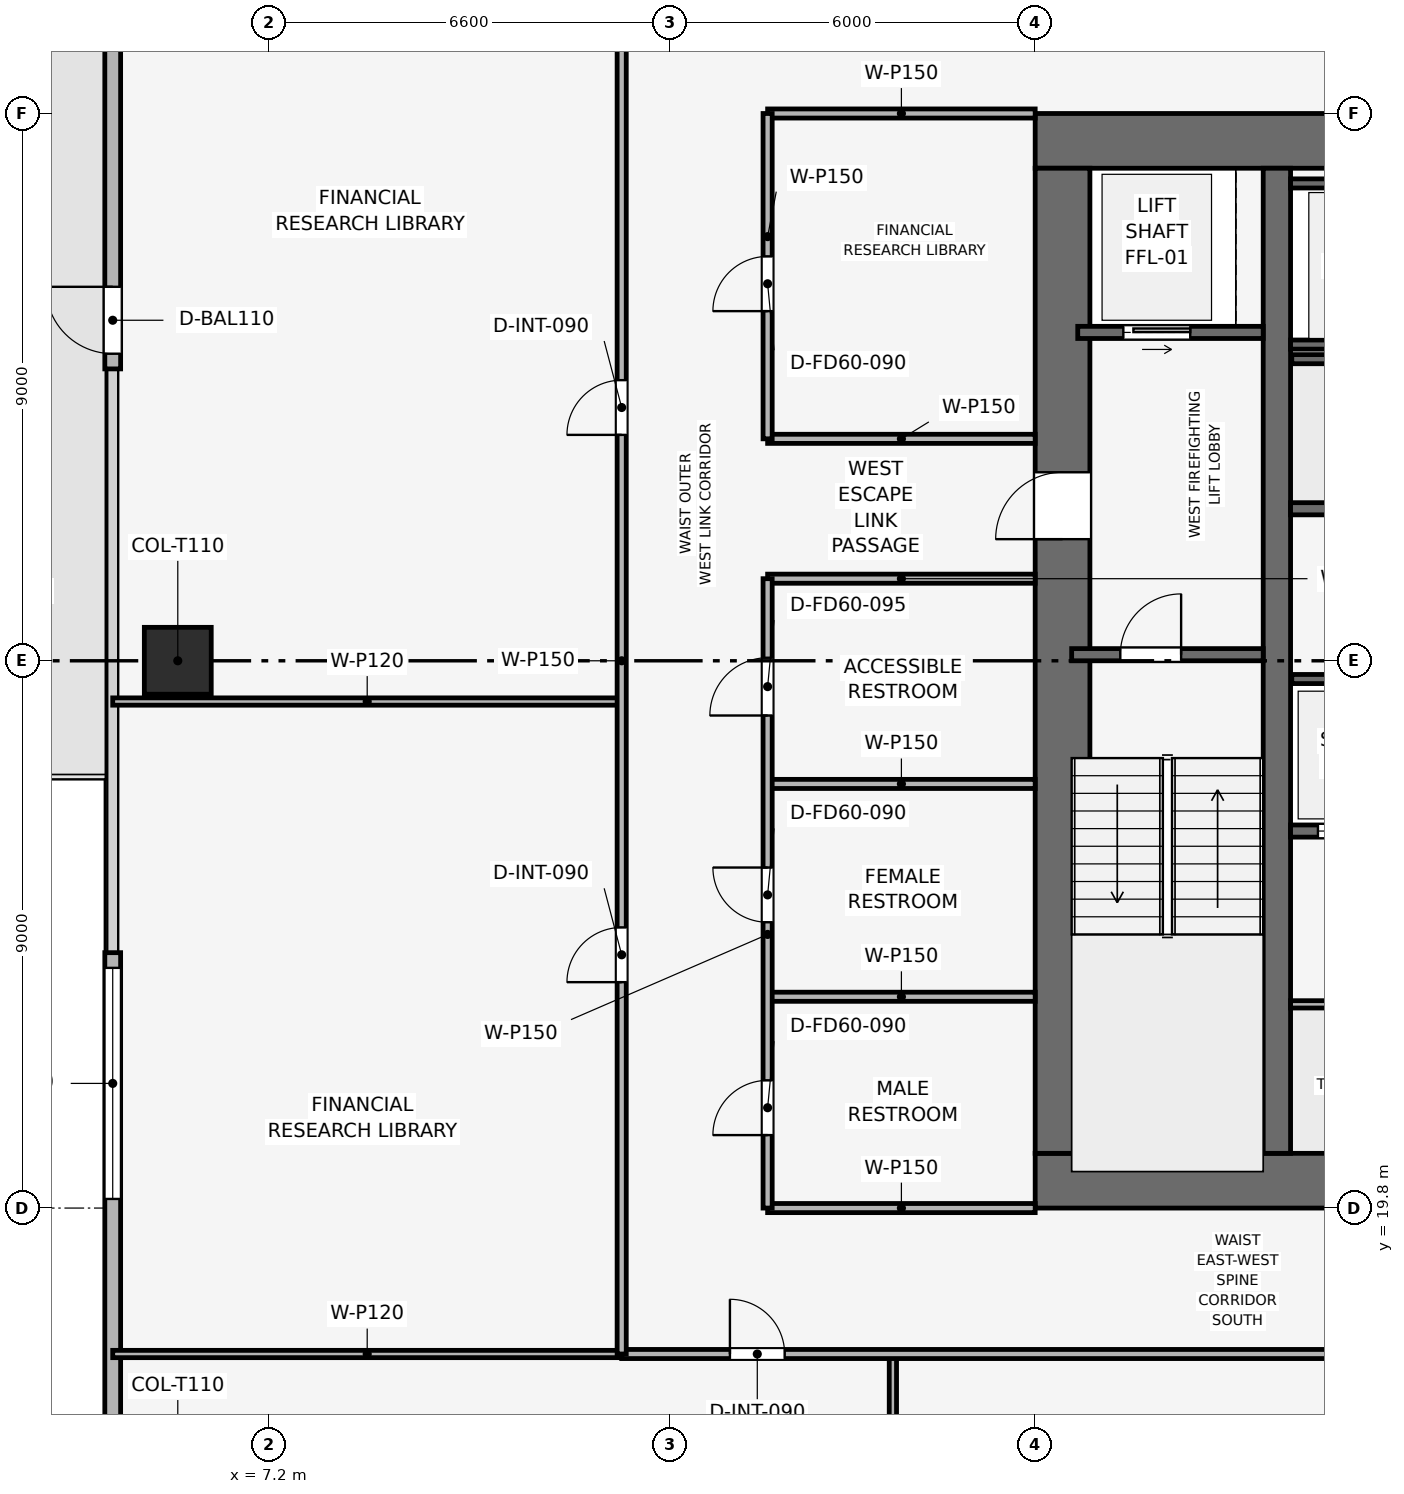
"""IFC4 building model, lengths in metres.
Left out: names, types, materials, properties, quantities, classifications, styles, units other than length and angle.
Written with IfcOpenShell. Run it as: python <this file> out.ifc"""

import sys

from ifc_helpers import new_model, si_unit, direction, frame, frame_2d, origin, origin_2d, place, context, subcontext, project, spatial, rectangle, extrude, element, fill, save


model = new_model("IFC4")
c1 = context("Model", 3, precision=1e-05, world=origin(), true_north=direction((0.0, 1.0)))
c2 = subcontext(c1, "Body", "Model", "MODEL_VIEW")
j1 = project(units=[si_unit("LENGTHUNIT", "METRE"), si_unit("PLANEANGLEUNIT", "RADIAN")], contexts=[c1])
p1 = place(None, origin())
s1 = spatial("IfcSite", under=j1, at=p1, CompositionType="ELEMENT")
p2 = place(p1, origin())
s2 = spatial("IfcBuilding", under=s1, at=p2, CompositionType="ELEMENT")
p3 = place(p2, frame((0.0, 0.0, 183.3)))
s3 = spatial("IfcBuildingStorey", under=s2, at=p3, CompositionType="ELEMENT", Elevation=183.3)
p4 = place(p3, frame((19.8, 20.25, 0.0), z_axis=(0.0, 0.0, 1.0), x_axis=(1.0, 0.0, 0.0)))
e1 = element("IfcWall", 1, at=p4, inside=s3, PredefinedType="SHEAR", context=c2, shape_type="SweptSolid", body=[
    extrude(rectangle(XDim=18.0, YDim=0.9, at=frame_2d((9.0, 0.0))), origin(), (0.0, 0.0, 1.0), 3.75),
])
p5 = place(p4, frame((8.4, 0.0, 0.0)))
e2 = element("IfcOpeningElement", 2, at=p5, cuts=e1, PredefinedType="OPENING", context=c2, shape_type="SweptSolid", body=[
    extrude(rectangle(XDim=1.2, YDim=2.2, at=frame_2d((0.6, 1.1))), frame((0.0, 0.46, 0.0), z_axis=(0.0, -1.0, 0.0), x_axis=(1.0, 0.0, 0.0)), (0.0, 0.0, 1.0), 0.92),
])
p6 = place(p3, frame((19.8, 37.35, 0.0), z_axis=(0.0, 0.0, 1.0), x_axis=(1.0, 0.0, 0.0)))
e3 = element("IfcWall", 3, at=p6, inside=s3, PredefinedType="SHEAR", context=c2, shape_type="SweptSolid", body=[
    extrude(rectangle(XDim=18.0, YDim=0.9, at=frame_2d((9.0, 0.0))), origin(), (0.0, 0.0, 1.0), 3.75),
])
p7 = place(p6, frame((7.05, 0.0, 0.0)))
e4 = element("IfcOpeningElement", 4, at=p7, cuts=e3, PredefinedType="OPENING", context=c2, shape_type="SweptSolid", body=[
    extrude(rectangle(XDim=1.1, YDim=2.15, at=frame_2d((0.55, 1.075))), frame((0.0, 0.46, 0.0), z_axis=(0.0, -1.0, 0.0), x_axis=(1.0, 0.0, 0.0)), (0.0, 0.0, 1.0), 0.92),
])
p8 = place(p3, frame((20.25, 20.7, 0.0), z_axis=(0.0, 0.0, 1.0), x_axis=(0.0, 1.0, 0.0)))
e5 = element("IfcWall", 5, at=p8, inside=s3, PredefinedType="SHEAR", context=c2, shape_type="SweptSolid", body=[
    extrude(rectangle(XDim=16.2, YDim=0.9, at=frame_2d((8.1, 0.0))), origin(), (0.0, 0.0, 1.0), 3.75),
])
p9 = place(p8, frame((10.1, 0.0, 0.0)))
e6 = element("IfcOpeningElement", 6, at=p9, cuts=e5, PredefinedType="OPENING", context=c2, shape_type="SweptSolid", body=[
    extrude(rectangle(XDim=1.1, YDim=2.15, at=frame_2d((0.55, 1.075))), frame((0.0, 0.46, 0.0), z_axis=(0.0, -1.0, 0.0), x_axis=(1.0, 0.0, 0.0)), (0.0, 0.0, 1.0), 0.92),
])
p10 = place(p3, frame((23.775, 20.7, 0.0), z_axis=(0.0, 0.0, 1.0), x_axis=(0.0, 1.0, 0.0)))
e7 = element("IfcWall", 7, at=p10, inside=s3, PredefinedType="SHEAR", context=c2, shape_type="SweptSolid", body=[
    extrude(rectangle(XDim=16.2, YDim=0.45, at=frame_2d((8.1, 0.0))), origin(), (0.0, 0.0, 1.0), 3.75),
])
p11 = place(p3, frame((5.7, 28.8, 0.003), z_axis=(0.0, 0.0, 1.0), x_axis=(1.0, 0.0, 0.0)))
e8 = element("IfcColumn", 8, at=p11, inside=s3, PredefinedType="COLUMN", context=c2, shape_type="SweptSolid", body=[
    extrude(rectangle(XDim=1.1, YDim=1.1, at=origin_2d()), origin(), (0.0, 0.0, 1.0), 3.489),
])
p12 = place(p3, frame((4.63, 11.4, 0.0), z_axis=(0.0, 0.0, 1.0), x_axis=(0.0, 1.0, 0.0)))
e9 = element("IfcWall", 9, at=p12, inside=s3, PredefinedType="SOLIDWALL", context=c2, shape_type="SweptSolid", body=[
    extrude(rectangle(XDim=12.6, YDim=0.26, at=frame_2d((6.3, 0.0))), origin(), (0.0, 0.0, 1.0), 3.495),
])
p13 = place(p12, frame((8.55, 0.0, 0.9)))
e10 = element("IfcOpeningElement", 10, at=p13, cuts=e9, PredefinedType="OPENING", context=c2, shape_type="SweptSolid", body=[
    extrude(rectangle(XDim=3.8, YDim=1.9, at=frame_2d((1.9, 0.95))), frame((0.0, 0.14, 0.0), z_axis=(0.0, -1.0, 0.0), x_axis=(1.0, 0.0, 0.0)), (0.0, 0.0, 1.0), 0.28),
])
p14 = place(p3, frame((4.63, 33.6, 0.0), z_axis=(0.0, 0.0, 1.0), x_axis=(0.0, 1.0, 0.0)))
e11 = element("IfcWall", 11, at=p14, inside=s3, PredefinedType="SOLIDWALL", context=c2, shape_type="SweptSolid", body=[
    extrude(rectangle(XDim=12.6, YDim=0.26, at=frame_2d((6.3, 0.0))), origin(), (0.0, 0.0, 1.0), 3.495),
])
p15 = place(p14, frame((0.25, 0.0, 0.0)))
e12 = element("IfcOpeningElement", 12, at=p15, cuts=e11, PredefinedType="OPENING", context=c2, shape_type="SweptSolid", body=[
    extrude(rectangle(XDim=1.1, YDim=2.2, at=frame_2d((0.55, 1.1))), frame((0.0, 0.14, 0.0), z_axis=(0.0, -1.0, 0.0), x_axis=(1.0, 0.0, 0.0)), (0.0, 0.0, 1.0), 0.28),
])
p16 = place(p3, frame((20.4, 28.9, 0.0), z_axis=(0.0, 0.0, 1.0), x_axis=(1.0, 0.0, 0.0)))
e13 = element("IfcWall", 13, at=p16, inside=s3, PredefinedType="SHEAR", context=c2, shape_type="SweptSolid", body=[
    extrude(rectangle(XDim=3.15, YDim=0.2, at=frame_2d((1.575, 0.0))), origin(), (0.0, 0.0, 1.0), 3.495),
])
p17 = place(p16, frame((0.8, 0.0, 0.0)))
e14 = element("IfcOpeningElement", 14, at=p17, cuts=e13, PredefinedType="OPENING", context=c2, shape_type="SweptSolid", body=[
    extrude(rectangle(XDim=1.0, YDim=2.1, at=frame_2d((0.5, 1.05))), frame((0.0, 0.11, 0.0), z_axis=(0.0, -1.0, 0.0), x_axis=(1.0, 0.0, 0.0)), (0.0, 0.0, 1.0), 0.22),
])
p18 = place(p3, frame((20.5, 34.2, 0.0), z_axis=(0.0, 0.0, 1.0), x_axis=(1.0, 0.0, 0.0)))
e15 = element("IfcWall", 15, at=p18, inside=s3, PredefinedType="SHEAR", context=c2, shape_type="SweptSolid", body=[
    extrude(rectangle(XDim=3.05, YDim=0.2, at=frame_2d((1.525, 0.0))), origin(), (0.0, 0.0, 1.0), 3.495),
])
p19 = place(p18, frame((0.75, 0.0, 0.0)))
e16 = element("IfcOpeningElement", 16, at=p19, cuts=e15, PredefinedType="OPENING", context=c2, shape_type="SweptSolid", body=[
    extrude(rectangle(XDim=1.1, YDim=2.15, at=frame_2d((0.55, 1.075))), frame((0.0, 0.11, 0.0), z_axis=(0.0, -1.0, 0.0), x_axis=(1.0, 0.0, 0.0)), (0.0, 0.0, 1.0), 0.22),
])
for number, where, z_axis, x_axis in (
    (17, (24.0, 34.0, 0.0), (0.0, 0.0, 1.0), (1.0, 0.0, 0.0)),
    (18, (24.0, 36.65, 0.0), (0.0, 0.0, 1.0), (1.0, 0.0, 0.0)),
):
    element("IfcWall", number, at=place(p3, frame(where, z_axis=z_axis, x_axis=x_axis)), inside=s3, PredefinedType="SHEAR", context=c2, shape_type="SweptSolid", body=[
        extrude(rectangle(XDim=2.48, YDim=0.15, at=frame_2d((1.24, 0.0))), origin(), (0.0, 0.0, 1.0), 3.495),
    ])
p20 = place(p3, frame((24.0, 26.0, 0.0), z_axis=(0.0, 0.0, 1.0), x_axis=(1.0, 0.0, 0.0)))
e19 = element("IfcWall", 19, at=p20, inside=s3, PredefinedType="SHEAR", context=c2, shape_type="SweptSolid", body=[
    extrude(rectangle(XDim=2.0, YDim=0.2, at=frame_2d((1.0, 0.0))), origin(), (0.0, 0.0, 1.0), 3.495),
])
p21 = place(p20, frame((0.45, 0.0, 0.0)))
e20 = element("IfcOpeningElement", 20, at=p21, cuts=e19, PredefinedType="OPENING", context=c2, shape_type="SweptSolid", body=[
    extrude(rectangle(XDim=1.1, YDim=2.15, at=frame_2d((0.55, 1.075))), frame((0.0, 0.11, 0.0), z_axis=(0.0, -1.0, 0.0), x_axis=(1.0, 0.0, 0.0)), (0.0, 0.0, 1.0), 0.22),
])
p22 = place(p3, frame((24.0, 31.3, 0.0), z_axis=(0.0, 0.0, 1.0), x_axis=(1.0, 0.0, 0.0)))
e21 = element("IfcWall", 21, at=p22, inside=s3, PredefinedType="SHEAR", context=c2, shape_type="SweptSolid", body=[
    extrude(rectangle(XDim=2.0, YDim=0.2, at=frame_2d((1.0, 0.0))), origin(), (0.0, 0.0, 1.0), 3.495),
])
for number, where, z_axis, x_axis in (
    (22, (24.02, 28.5, 0.0), (0.0, 0.0, 1.0), (1.0, 0.0, 0.0)),
    (23, (24.02, 33.76, 0.0), (0.0, 0.0, 1.0), (1.0, 0.0, 0.0)),
):
    element("IfcWall", number, at=place(p3, frame(where, z_axis=z_axis, x_axis=x_axis)), inside=s3, PredefinedType="SHEAR", context=c2, shape_type="SweptSolid", body=[
        extrude(rectangle(XDim=4.08, YDim=0.15, at=frame_2d((2.04, 0.0))), origin(), (0.0, 0.0, 1.0), 3.495),
    ])
p23 = place(p3, frame((24.0, 23.15, 0.0), z_axis=(0.0, 0.0, 1.0), x_axis=(1.0, 0.0, 0.0)))
e24 = element("IfcWall", 24, at=p23, inside=s3, PredefinedType="PARTITIONING", context=c2, shape_type="SweptSolid", body=[
    extrude(rectangle(XDim=4.05, YDim=0.12, at=frame_2d((2.025, 0.0))), origin(), (0.0, 0.0, 1.0), 3.495),
])
p24 = place(p23, frame((1.575, 0.0, 0.0)))
e25 = element("IfcOpeningElement", 25, at=p24, cuts=e24, PredefinedType="OPENING", context=c2, shape_type="SweptSolid", body=[
    extrude(rectangle(XDim=0.9, YDim=2.1, at=frame_2d((0.45, 1.05))), frame((0.0, 0.07, 0.0), z_axis=(0.0, -1.0, 0.0), x_axis=(1.0, 0.0, 0.0)), (0.0, 0.0, 1.0), 0.14),
])
p25 = place(p3, frame((15.4, 19.8, 0.0), z_axis=(0.0, 0.0, 1.0), x_axis=(1.0, 0.0, 0.0)))
e26 = element("IfcWall", 26, at=p25, inside=s3, PredefinedType="PARTITIONING", context=c2, shape_type="SweptSolid", body=[
    extrude(rectangle(XDim=4.4, YDim=0.15, at=frame_2d((2.2, 0.0))), origin(), (0.0, 0.0, 1.0), 3.03),
])
for number, where, z_axis, x_axis in (
    (27, (15.4, 23.275, 0.0), (0.0, 0.0, 1.0), (1.0, 0.0, 0.0)),
    (28, (15.4, 26.775, 0.0), (0.0, 0.0, 1.0), (1.0, 0.0, 0.0)),
    (29, (15.4, 30.15, 0.0), (0.0, 0.0, 1.0), (1.0, 0.0, 0.0)),
    (30, (15.4, 32.45, 0.0), (0.0, 0.0, 1.0), (1.0, 0.0, 0.0)),
):
    element("IfcWall", number, at=place(p3, frame(where, z_axis=z_axis, x_axis=x_axis)), inside=s3, PredefinedType="PARTITIONING", context=c2, shape_type="SweptSolid", body=[
        extrude(rectangle(XDim=4.4, YDim=0.15, at=frame_2d((2.2, 0.0))), origin(), (0.0, 0.0, 1.0), 3.495),
    ])
p26 = place(p3, frame((15.4, 37.8, 0.0), z_axis=(0.0, 0.0, 1.0), x_axis=(1.0, 0.0, 0.0)))
e31 = element("IfcWall", 31, at=p26, inside=s3, PredefinedType="PARTITIONING", context=c2, shape_type="SweptSolid", body=[
    extrude(rectangle(XDim=4.4, YDim=0.15, at=frame_2d((2.2, 0.0))), origin(), (0.0, 0.0, 1.0), 3.03),
])
p27 = place(p3, frame((15.4, 19.8, 0.0), z_axis=(0.0, 0.0, 1.0), x_axis=(0.0, 1.0, 0.0)))
e32 = element("IfcWall", 32, at=p27, inside=s3, PredefinedType="PARTITIONING", context=c2, shape_type="SweptSolid", body=[
    extrude(rectangle(XDim=10.35, YDim=0.15, at=frame_2d((5.175, 0.0))), origin(), (0.0, 0.0, 1.0), 3.03),
])
p28 = place(p27, frame((1.2, 0.0, 0.0)))
e33 = element("IfcOpeningElement", 33, at=p28, cuts=e32, PredefinedType="OPENING", context=c2, shape_type="SweptSolid", body=[
    extrude(rectangle(XDim=0.9, YDim=2.1, at=frame_2d((0.45, 1.05))), frame((0.0, 0.085, 0.0), z_axis=(0.0, -1.0, 0.0), x_axis=(1.0, 0.0, 0.0)), (0.0, 0.0, 1.0), 0.17),
])
p29 = place(p27, frame((4.7, 0.0, 0.0)))
e34 = element("IfcOpeningElement", 34, at=p29, cuts=e32, PredefinedType="OPENING", context=c2, shape_type="SweptSolid", body=[
    extrude(rectangle(XDim=0.9, YDim=2.1, at=frame_2d((0.45, 1.05))), frame((0.0, 0.085, 0.0), z_axis=(0.0, -1.0, 0.0), x_axis=(1.0, 0.0, 0.0)), (0.0, 0.0, 1.0), 0.17),
])
p30 = place(p27, frame((8.1, 0.0, 0.0)))
e35 = element("IfcOpeningElement", 35, at=p30, cuts=e32, PredefinedType="OPENING", context=c2, shape_type="SweptSolid", body=[
    extrude(rectangle(XDim=0.95, YDim=2.1, at=frame_2d((0.475, 1.05))), frame((0.0, 0.085, 0.0), z_axis=(0.0, -1.0, 0.0), x_axis=(1.0, 0.0, 0.0)), (0.0, 0.0, 1.0), 0.17),
])
p31 = place(p3, frame((15.4, 32.45, 0.0), z_axis=(0.0, 0.0, 1.0), x_axis=(0.0, 1.0, 0.0)))
e36 = element("IfcWall", 36, at=p31, inside=s3, PredefinedType="PARTITIONING", context=c2, shape_type="SweptSolid", body=[
    extrude(rectangle(XDim=5.35, YDim=0.15, at=frame_2d((2.675, 0.0))), origin(), (0.0, 0.0, 1.0), 3.03),
])
p32 = place(p31, frame((2.1, 0.0, 0.0)))
e37 = element("IfcOpeningElement", 37, at=p32, cuts=e36, PredefinedType="OPENING", context=c2, shape_type="SweptSolid", body=[
    extrude(rectangle(XDim=0.9, YDim=2.1, at=frame_2d((0.45, 1.05))), frame((0.0, 0.085, 0.0), z_axis=(0.0, -1.0, 0.0), x_axis=(1.0, 0.0, 0.0)), (0.0, 0.0, 1.0), 0.17),
])
p33 = place(p3, frame((17.46, 4.63, 0.0), z_axis=(0.0, 0.0, 1.0), x_axis=(0.0, 1.0, 0.0)))
e38 = element("IfcWall", 38, at=p33, inside=s3, PredefinedType="PARTITIONING", context=c2, shape_type="SweptSolid", body=[
    extrude(rectangle(XDim=12.77, YDim=0.12, at=frame_2d((6.385, 0.0))), origin(), (0.0, 0.0, 1.0), 2.98),
])
for number, where, z_axis, x_axis in (
    (39, (4.63, 28.13, 0.0), (0.0, 0.0, 1.0), (1.0, 0.0, 0.0)),
    (40, (4.63, 17.4, 0.0), (0.0, 0.0, 1.0), (1.0, 0.0, 0.0)),
):
    element("IfcWall", number, at=place(p3, frame(where, z_axis=z_axis, x_axis=x_axis)), inside=s3, PredefinedType="PARTITIONING", context=c2, shape_type="SweptSolid", body=[
        extrude(rectangle(XDim=8.37, YDim=0.12, at=frame_2d((4.185, 0.0))), origin(), (0.0, 0.0, 1.0), 2.98),
    ])
p34 = place(p3, frame((13.0, 17.4, 0.0), z_axis=(0.0, 0.0, 1.0), x_axis=(1.0, 0.0, 0.0)))
e41 = element("IfcWall", 41, at=p34, inside=s3, PredefinedType="PARTITIONING", context=c2, shape_type="SweptSolid", body=[
    extrude(rectangle(XDim=31.6, YDim=0.15, at=frame_2d((15.8, 0.0))), origin(), (0.0, 0.0, 1.0), 3.03),
])
p35 = place(p34, frame((1.78, 0.0, 0.0)))
e42 = element("IfcOpeningElement", 42, at=p35, cuts=e41, PredefinedType="OPENING", context=c2, shape_type="SweptSolid", body=[
    extrude(rectangle(XDim=0.9, YDim=2.1, at=frame_2d((0.45, 1.05))), frame((0.0, 0.085, 0.0), z_axis=(0.0, -1.0, 0.0), x_axis=(1.0, 0.0, 0.0)), (0.0, 0.0, 1.0), 0.17),
])
p36 = place(p34, frame((17.58, 0.0, 0.0)))
e43 = element("IfcOpeningElement", 43, at=p36, cuts=e41, PredefinedType="OPENING", context=c2, shape_type="SweptSolid", body=[
    extrude(rectangle(XDim=0.9, YDim=2.1, at=frame_2d((0.45, 1.05))), frame((0.0, 0.085, 0.0), z_axis=(0.0, -1.0, 0.0), x_axis=(1.0, 0.0, 0.0)), (0.0, 0.0, 1.0), 0.17),
])
p37 = place(p3, frame((13.0, 17.4, 0.0), z_axis=(0.0, 0.0, 1.0), x_axis=(0.0, 1.0, 0.0)))
e44 = element("IfcWall", 44, at=p37, inside=s3, PredefinedType="PARTITIONING", context=c2, shape_type="SweptSolid", body=[
    extrude(rectangle(XDim=22.8, YDim=0.15, at=frame_2d((11.4, 0.0))), origin(), (0.0, 0.0, 1.0), 3.03),
])
p38 = place(p37, frame((6.115, 0.0, 0.0)))
e45 = element("IfcOpeningElement", 45, at=p38, cuts=e44, PredefinedType="OPENING", context=c2, shape_type="SweptSolid", body=[
    extrude(rectangle(XDim=0.9, YDim=2.1, at=frame_2d((0.45, 1.05))), frame((0.0, 0.085, 0.0), z_axis=(0.0, -1.0, 0.0), x_axis=(1.0, 0.0, 0.0)), (0.0, 0.0, 1.0), 0.17),
])
p39 = place(p37, frame((15.115, 0.0, 0.0)))
e46 = element("IfcOpeningElement", 46, at=p39, cuts=e44, PredefinedType="OPENING", context=c2, shape_type="SweptSolid", body=[
    extrude(rectangle(XDim=0.9, YDim=2.1, at=frame_2d((0.45, 1.05))), frame((0.0, 0.085, 0.0), z_axis=(0.0, -1.0, 0.0), x_axis=(1.0, 0.0, 0.0)), (0.0, 0.0, 1.0), 0.17),
])
p40 = place(p15, origin())
e47 = element("IfcDoor", 47, at=p40, inside=s3, OperationType="SINGLE_SWING_RIGHT", PredefinedType="DOOR", context=c2, shape_type="SweptSolid", body=[
    extrude(rectangle(XDim=1.1, YDim=2.2, at=frame_2d((0.55, 1.1))), frame((0.0, 0.025, 0.0), z_axis=(0.0, -1.0, 0.0), x_axis=(1.0, 0.0, 0.0)), (0.0, 0.0, 1.0), 0.05),
])
fill(e12, e47)
p41 = place(p13, origin())
e48 = element("IfcWindow", 48, at=p41, inside=s3, PartitioningType="SINGLE_PANEL", PredefinedType="WINDOW", context=c2, shape_type="SweptSolid", body=[
    extrude(rectangle(XDim=3.8, YDim=1.9, at=frame_2d((1.9, 0.95))), frame((0.0, 0.03, 0.0), z_axis=(0.0, -1.0, 0.0), x_axis=(1.0, 0.0, 0.0)), (0.0, 0.0, 1.0), 0.06),
])
fill(e10, e48)
p42 = place(p17, origin())
e49 = element("IfcDoor", 49, at=p42, inside=s3, OperationType="SINGLE_SWING_RIGHT", PredefinedType="DOOR", context=c2, shape_type="SweptSolid", body=[
    extrude(rectangle(XDim=1.0, YDim=2.1, at=frame_2d((0.5, 1.05))), frame((0.0, 0.025, 0.0), z_axis=(0.0, -1.0, 0.0), x_axis=(1.0, 0.0, 0.0)), (0.0, 0.0, 1.0), 0.05),
])
fill(e14, e49)
p43 = place(p19, origin())
e50 = element("IfcDoor", 50, at=p43, inside=s3, OperationType="SLIDING_TO_RIGHT", PredefinedType="DOOR", context=c2, shape_type="SweptSolid", body=[
    extrude(rectangle(XDim=1.1, YDim=2.15, at=frame_2d((0.55, 1.075))), frame((0.0, 0.025, 0.0), z_axis=(0.0, -1.0, 0.0), x_axis=(1.0, 0.0, 0.0)), (0.0, 0.0, 1.0), 0.05),
])
fill(e16, e50)
p44 = place(p21, origin())
e51 = element("IfcDoor", 51, at=p44, inside=s3, OperationType="SLIDING_TO_RIGHT", PredefinedType="DOOR", context=c2, shape_type="SweptSolid", body=[
    extrude(rectangle(XDim=1.1, YDim=2.15, at=frame_2d((0.55, 1.075))), frame((0.0, 0.025, 0.0), z_axis=(0.0, -1.0, 0.0), x_axis=(1.0, 0.0, 0.0)), (0.0, 0.0, 1.0), 0.05),
])
fill(e20, e51)
p45 = place(p28, origin())
e52 = element("IfcDoor", 52, at=p45, inside=s3, OperationType="SINGLE_SWING_LEFT", PredefinedType="DOOR", context=c2, shape_type="SweptSolid", body=[
    extrude(rectangle(XDim=0.9, YDim=2.1, at=frame_2d((0.45, 1.05))), frame((0.0, 0.025, 0.0), z_axis=(0.0, -1.0, 0.0), x_axis=(1.0, 0.0, 0.0)), (0.0, 0.0, 1.0), 0.05),
])
fill(e33, e52)
p46 = place(p29, origin())
e53 = element("IfcDoor", 53, at=p46, inside=s3, OperationType="SINGLE_SWING_RIGHT", PredefinedType="DOOR", context=c2, shape_type="SweptSolid", body=[
    extrude(rectangle(XDim=0.9, YDim=2.1, at=frame_2d((0.45, 1.05))), frame((0.0, 0.025, 0.0), z_axis=(0.0, -1.0, 0.0), x_axis=(1.0, 0.0, 0.0)), (0.0, 0.0, 1.0), 0.05),
])
fill(e34, e53)
p47 = place(p30, origin())
e54 = element("IfcDoor", 54, at=p47, inside=s3, OperationType="SINGLE_SWING_LEFT", PredefinedType="DOOR", context=c2, shape_type="SweptSolid", body=[
    extrude(rectangle(XDim=0.95, YDim=2.1, at=frame_2d((0.475, 1.05))), frame((0.0, 0.025, 0.0), z_axis=(0.0, -1.0, 0.0), x_axis=(1.0, 0.0, 0.0)), (0.0, 0.0, 1.0), 0.05),
])
fill(e35, e54)
p48 = place(p32, origin())
e55 = element("IfcDoor", 55, at=p48, inside=s3, OperationType="SINGLE_SWING_LEFT", PredefinedType="DOOR", context=c2, shape_type="SweptSolid", body=[
    extrude(rectangle(XDim=0.9, YDim=2.1, at=frame_2d((0.45, 1.05))), frame((0.0, 0.025, 0.0), z_axis=(0.0, -1.0, 0.0), x_axis=(1.0, 0.0, 0.0)), (0.0, 0.0, 1.0), 0.05),
])
fill(e37, e55)
p49 = place(p35, origin())
e56 = element("IfcDoor", 56, at=p49, inside=s3, OperationType="SINGLE_SWING_LEFT", PredefinedType="DOOR", context=c2, shape_type="SweptSolid", body=[
    extrude(rectangle(XDim=0.9, YDim=2.1, at=frame_2d((0.45, 1.05))), frame((0.0, 0.025, 0.0), z_axis=(0.0, -1.0, 0.0), x_axis=(1.0, 0.0, 0.0)), (0.0, 0.0, 1.0), 0.05),
])
fill(e42, e56)
p50 = place(p38, origin())
e57 = element("IfcDoor", 57, at=p50, inside=s3, OperationType="SINGLE_SWING_LEFT", PredefinedType="DOOR", context=c2, shape_type="SweptSolid", body=[
    extrude(rectangle(XDim=0.9, YDim=2.1, at=frame_2d((0.45, 1.05))), frame((0.0, 0.025, 0.0), z_axis=(0.0, -1.0, 0.0), x_axis=(1.0, 0.0, 0.0)), (0.0, 0.0, 1.0), 0.05),
])
fill(e45, e57)
p51 = place(p39, origin())
e58 = element("IfcDoor", 58, at=p51, inside=s3, OperationType="SINGLE_SWING_LEFT", PredefinedType="DOOR", context=c2, shape_type="SweptSolid", body=[
    extrude(rectangle(XDim=0.9, YDim=2.1, at=frame_2d((0.45, 1.05))), frame((0.0, 0.025, 0.0), z_axis=(0.0, -1.0, 0.0), x_axis=(1.0, 0.0, 0.0)), (0.0, 0.0, 1.0), 0.05),
])
fill(e46, e58)
p52 = place(p9, origin())
e59 = element("IfcDoor", 59, at=p52, inside=s3, OperationType="SINGLE_SWING_LEFT", PredefinedType="DOOR", context=c2, shape_type="SweptSolid", body=[
    extrude(rectangle(XDim=1.1, YDim=2.15, at=frame_2d((0.55, 1.075))), frame((0.0, 0.025, 0.0), z_axis=(0.0, -1.0, 0.0), x_axis=(1.0, 0.0, 0.0)), (0.0, 0.0, 1.0), 0.05),
])
fill(e6, e59)
save(model, sys.argv[1])
